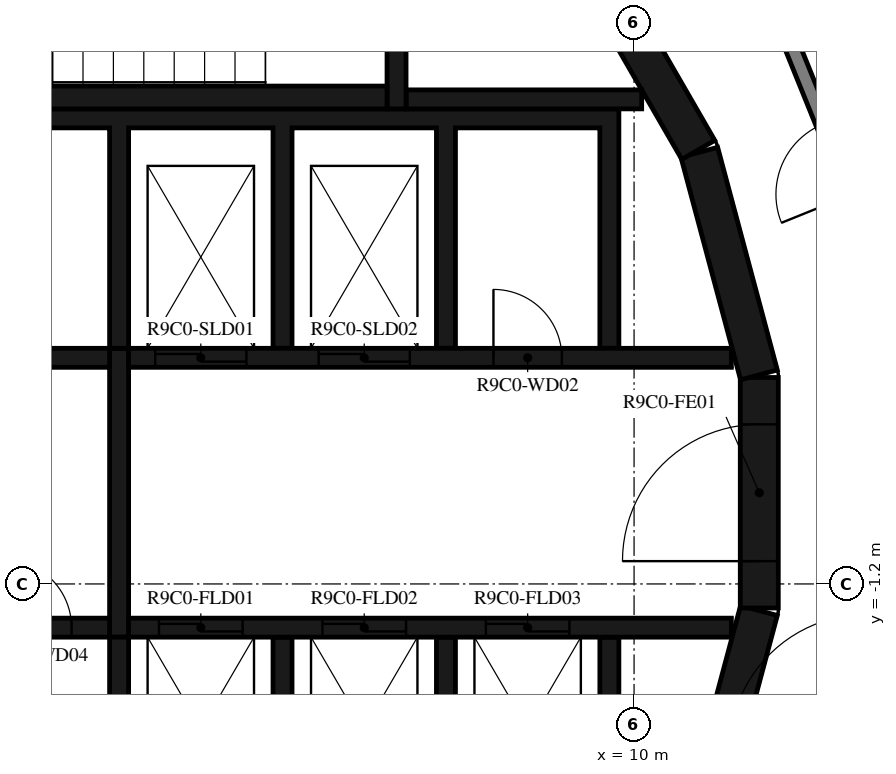
"""IFC4 building model, lengths in metres.
Left out: names, types, materials, properties, quantities, classifications, styles, units other than length and angle.
Written with IfcOpenShell. Run it as: python <this file> out.ifc"""

import sys

from ifc_helpers import new_model, si_unit, direction, frame, frame_2d, origin, place, context, subcontext, project, spatial, polyline, rectangle, outline, extrude, element, fill, save


model = new_model("IFC4")
c1 = context("Model", 3, precision=1e-05, world=origin(), true_north=direction((0.0, 1.0)))
c2 = subcontext(c1, "Body", "Model", "MODEL_VIEW")
j1 = project(units=[si_unit("LENGTHUNIT", "METRE"), si_unit("PLANEANGLEUNIT", "RADIAN")], contexts=[c1])
p1 = place(None, origin())
s1 = spatial("IfcSite", under=j1, at=p1, CompositionType="ELEMENT")
p2 = place(p1, origin())
s2 = spatial("IfcBuilding", under=s1, at=p2, CompositionType="ELEMENT")
p3 = place(p2, frame((0.0, 0.0, 354.0)))
s3 = spatial("IfcBuildingStorey", under=s2, at=p3, CompositionType="ELEMENT", Elevation=354.0)
p4 = place(p3, frame((10.858, -4.479, 0.0), z_axis=(0.0, 0.0, 1.0), x_axis=(0.258734743916, 0.965948410781, 0.0)))
e1 = element("IfcWall", 1, at=p4, inside=s3, PredefinedType="SHEAR", context=c2, shape_type="SweptSolid", body=[
    extrude(rectangle(XDim=3.033, YDim=0.5, at=frame_2d((1.516, 0.0))), origin(), (0.0, 0.0, 1.0), 3.12),
])
p5 = place(p3, frame((11.647, -1.516, 0.0), z_axis=(0.0, 0.0, 1.0), x_axis=(0.0, 1.0, 0.0)))
e2 = element("IfcWall", 2, at=p5, inside=s3, PredefinedType="SHEAR", context=c2, shape_type="SweptSolid", body=[
    extrude(rectangle(XDim=3.033, YDim=0.5, at=frame_2d((1.516, 0.0))), origin(), (0.0, 0.0, 1.0), 3.12),
])
p6 = place(p5, frame((0.616, 0.0, 0.0)))
e3 = element("IfcOpeningElement", 3, at=p6, cuts=e2, PredefinedType="OPENING", context=c2, shape_type="SweptSolid", body=[
    extrude(rectangle(XDim=1.8, YDim=2.1, at=frame_2d((0.9, 1.05))), frame((0.0, 0.26, 0.0), z_axis=(0.0, -1.0, 0.0), x_axis=(1.0, 0.0, 0.0)), (0.0, 0.0, 1.0), 0.52),
])
for number, where, z_axis, x_axis in (
    (4, (11.643, 1.55, 0.0), (0.0, 0.0, 1.0), (-0.259, 0.966, 0.0)),
    (5, (10.845, 4.51, 0.0), (0.0, 0.0, 1.0), (-0.5, 0.866, 0.0)),
):
    element("IfcWall", number, at=place(p3, frame(where, z_axis=z_axis, x_axis=x_axis)), inside=s3, PredefinedType="SHEAR", context=c2, shape_type="SweptSolid", body=[
        extrude(rectangle(XDim=3.033, YDim=0.5, at=frame_2d((1.516, 0.0))), origin(), (0.0, 0.0, 1.0), 3.12),
    ])
p7 = place(p3, frame((0.0, 5.2, 0.0), z_axis=(0.0, 0.0, 1.0), x_axis=(1.0, 0.0, 0.0)))
e6 = element("IfcWall", 6, at=p7, inside=s3, PredefinedType="SHEAR", context=c2, shape_type="SweptSolid", body=[
    extrude(rectangle(XDim=6.75, YDim=0.3, at=frame_2d((3.375, 0.0))), origin(), (0.0, 0.0, 1.0), 3.12),
])
p8 = place(p3, frame((6.875, 5.05, 0.0), z_axis=(0.0, 0.0, 1.0), x_axis=(0.0, 1.0, 0.0)))
e7 = element("IfcWall", 7, at=p8, inside=s3, PredefinedType="SHEAR", context=c2, shape_type="SweptSolid", body=[
    extrude(rectangle(XDim=3.92, YDim=0.25, at=frame_2d((1.96, 0.0))), origin(), (0.0, 0.0, 1.0), 3.12),
])
p9 = place(p8, frame((1.11, 0.0, 0.0)))
e8 = element("IfcOpeningElement", 8, at=p9, cuts=e7, PredefinedType="OPENING", context=c2, shape_type="SweptSolid", body=[
    extrude(rectangle(XDim=1.2, YDim=2.1, at=frame_2d((0.6, 1.05))), frame((0.0, 0.135, 0.0), z_axis=(0.0, -1.0, 0.0), x_axis=(1.0, 0.0, 0.0)), (0.0, 0.0, 1.0), 0.27),
])
p10 = place(p3, frame((7.0, 5.175, 0.0), z_axis=(0.0, 0.0, 1.0), x_axis=(1.0, 0.0, 0.0)))
e9 = element("IfcWall", 9, at=p10, inside=s3, PredefinedType="SHEAR", context=c2, shape_type="SweptSolid", body=[
    extrude(rectangle(XDim=3.1, YDim=0.25, at=frame_2d((1.55, 0.0))), origin(), (0.0, 0.0, 1.0), 3.12),
])
p11 = place(p3, origin())
e10 = element("IfcWall", 10, at=p11, inside=s3, PredefinedType="SHEAR", context=c2, shape_type="SweptSolid", body=[
    extrude(outline(polyline([(-9.8, 1.9), (-9.55, 1.9), (-9.55, 4.8), (3.1, 4.8), (3.1, 1.9), (3.35, 1.9), (3.35, 4.8), (5.25, 4.8), (5.25, 1.9), (5.5, 1.9), (5.5, 4.8), (7.4, 4.8), (7.4, 1.9), (7.65, 1.9), (7.65, 4.8), (9.55, 4.8), (9.55, 1.9), (9.8, 1.9), (9.8, 4.8), (9.8, 5.05), (-9.8, 5.05), (-9.8, 4.8), (-9.8, 1.9)])), origin(), (0.0, 0.0, 1.0), 3.12),
])
p12 = place(p3, origin())
e11 = element("IfcWall", 11, at=p12, inside=s3, PredefinedType="SHEAR", context=c2, shape_type="SweptSolid", body=[
    extrude(outline(polyline([(9.8, -5.05), (9.8, -4.8), (9.8, -1.9), (9.55, -1.9), (9.55, -4.8), (7.65, -4.8), (7.65, -1.9), (7.4, -1.9), (7.4, -4.8), (5.5, -4.8), (5.5, -1.9), (5.25, -1.9), (5.25, -4.8), (3.35, -4.8), (3.35, -1.9), (3.1, -1.9), (3.1, -4.8), (1.2, -4.8), (1.2, -1.9), (0.95, -1.9), (0.95, -4.8), (-0.95, -4.8), (-0.95, -1.9), (-1.2, -1.9), (-1.2, -4.8), (-3.1, -4.8), (-3.1, -1.9), (-3.35, -1.9), (-3.35, -4.8), (-5.25, -4.8), (-5.25, -1.9), (-5.5, -1.9), (-5.5, -4.8), (-9.55, -4.8), (-9.55, -1.9), (-9.8, -1.9), (-9.8, -4.8), (-9.8, -5.05), (9.8, -5.05)])), origin(), (0.0, 0.0, 1.0), 3.12),
])
p13 = place(p3, frame((-11.28, 1.775, 0.0), z_axis=(0.0, 0.0, 1.0), x_axis=(1.0, 0.0, 0.0)))
e12 = element("IfcWall", 12, at=p13, inside=s3, PredefinedType="SHEAR", context=c2, shape_type="SweptSolid", body=[
    extrude(rectangle(XDim=14.38, YDim=0.25, at=frame_2d((7.19, 0.0))), origin(), (0.0, 0.0, 1.0), 3.12),
])
p14 = place(p13, frame((7.605, 0.0, 0.0)))
e13 = element("IfcOpeningElement", 13, at=p14, cuts=e12, PredefinedType="OPENING", context=c2, shape_type="SweptSolid", body=[
    extrude(rectangle(XDim=0.9, YDim=2.1, at=frame_2d((0.45, 1.05))), frame((0.0, 0.135, 0.0), z_axis=(0.0, -1.0, 0.0), x_axis=(1.0, 0.0, 0.0)), (0.0, 0.0, 1.0), 0.27),
])
p15 = place(p3, frame((3.35, 1.775, 0.0), z_axis=(0.0, 0.0, 1.0), x_axis=(1.0, 0.0, 0.0)))
e14 = element("IfcWall", 14, at=p15, inside=s3, PredefinedType="SHEAR", context=c2, shape_type="SweptSolid", body=[
    extrude(rectangle(XDim=7.93, YDim=0.25, at=frame_2d((3.965, 0.0))), origin(), (0.0, 0.0, 1.0), 3.12),
])
p16 = place(p15, frame((0.35, 0.0, 0.0)))
e15 = element("IfcOpeningElement", 15, at=p16, cuts=e14, PredefinedType="OPENING", context=c2, shape_type="SweptSolid", body=[
    extrude(rectangle(XDim=1.2, YDim=2.4, at=frame_2d((0.6, 1.2))), frame((0.0, 0.135, 0.0), z_axis=(0.0, -1.0, 0.0), x_axis=(1.0, 0.0, 0.0)), (0.0, 0.0, 1.0), 0.27),
])
p17 = place(p15, frame((2.5, 0.0, 0.0)))
e16 = element("IfcOpeningElement", 16, at=p17, cuts=e14, PredefinedType="OPENING", context=c2, shape_type="SweptSolid", body=[
    extrude(rectangle(XDim=1.2, YDim=2.4, at=frame_2d((0.6, 1.2))), frame((0.0, 0.135, 0.0), z_axis=(0.0, -1.0, 0.0), x_axis=(1.0, 0.0, 0.0)), (0.0, 0.0, 1.0), 0.27),
])
p18 = place(p15, frame((4.8, 0.0, 0.0)))
e17 = element("IfcOpeningElement", 17, at=p18, cuts=e14, PredefinedType="OPENING", context=c2, shape_type="SweptSolid", body=[
    extrude(rectangle(XDim=0.9, YDim=2.1, at=frame_2d((0.45, 1.05))), frame((0.0, 0.135, 0.0), z_axis=(0.0, -1.0, 0.0), x_axis=(1.0, 0.0, 0.0)), (0.0, 0.0, 1.0), 0.27),
])
p19 = place(p3, frame((-11.28, -1.775, 0.0), z_axis=(0.0, 0.0, 1.0), x_axis=(1.0, 0.0, 0.0)))
e18 = element("IfcWall", 18, at=p19, inside=s3, PredefinedType="SHEAR", context=c2, shape_type="SweptSolid", body=[
    extrude(rectangle(XDim=14.38, YDim=0.25, at=frame_2d((7.19, 0.0))), origin(), (0.0, 0.0, 1.0), 3.12),
])
p20 = place(p19, frame((6.43, 0.0, 0.0)))
e19 = element("IfcOpeningElement", 19, at=p20, cuts=e18, PredefinedType="OPENING", context=c2, shape_type="SweptSolid", body=[
    extrude(rectangle(XDim=1.1, YDim=2.1, at=frame_2d((0.55, 1.05))), frame((0.0, 0.135, 0.0), z_axis=(0.0, -1.0, 0.0), x_axis=(1.0, 0.0, 0.0)), (0.0, 0.0, 1.0), 0.27),
])
p21 = place(p19, frame((8.58, 0.0, 0.0)))
e20 = element("IfcOpeningElement", 20, at=p21, cuts=e18, PredefinedType="OPENING", context=c2, shape_type="SweptSolid", body=[
    extrude(rectangle(XDim=1.1, YDim=2.1, at=frame_2d((0.55, 1.05))), frame((0.0, 0.135, 0.0), z_axis=(0.0, -1.0, 0.0), x_axis=(1.0, 0.0, 0.0)), (0.0, 0.0, 1.0), 0.27),
])
p22 = place(p19, frame((10.73, 0.0, 0.0)))
e21 = element("IfcOpeningElement", 21, at=p22, cuts=e18, PredefinedType="OPENING", context=c2, shape_type="SweptSolid", body=[
    extrude(rectangle(XDim=1.1, YDim=2.1, at=frame_2d((0.55, 1.05))), frame((0.0, 0.135, 0.0), z_axis=(0.0, -1.0, 0.0), x_axis=(1.0, 0.0, 0.0)), (0.0, 0.0, 1.0), 0.27),
])
p23 = place(p19, frame((3.305, 0.0, 0.0)))
e22 = element("IfcOpeningElement", 22, at=p23, cuts=e18, PredefinedType="OPENING", context=c2, shape_type="SweptSolid", body=[
    extrude(rectangle(XDim=0.9, YDim=2.1, at=frame_2d((0.45, 1.05))), frame((0.0, 0.135, 0.0), z_axis=(0.0, -1.0, 0.0), x_axis=(1.0, 0.0, 0.0)), (0.0, 0.0, 1.0), 0.27),
])
p24 = place(p19, frame((12.98, 0.0, 0.0)))
e23 = element("IfcOpeningElement", 23, at=p24, cuts=e18, PredefinedType="OPENING", context=c2, shape_type="SweptSolid", body=[
    extrude(rectangle(XDim=0.9, YDim=2.1, at=frame_2d((0.45, 1.05))), frame((0.0, 0.135, 0.0), z_axis=(0.0, -1.0, 0.0), x_axis=(1.0, 0.0, 0.0)), (0.0, 0.0, 1.0), 0.27),
])
p25 = place(p3, frame((3.35, -1.775, 0.0), z_axis=(0.0, 0.0, 1.0), x_axis=(1.0, 0.0, 0.0)))
e24 = element("IfcWall", 24, at=p25, inside=s3, PredefinedType="SHEAR", context=c2, shape_type="SweptSolid", body=[
    extrude(rectangle(XDim=7.93, YDim=0.25, at=frame_2d((3.965, 0.0))), origin(), (0.0, 0.0, 1.0), 3.12),
])
p26 = place(p25, frame((0.4, 0.0, 0.0)))
e25 = element("IfcOpeningElement", 25, at=p26, cuts=e24, PredefinedType="OPENING", context=c2, shape_type="SweptSolid", body=[
    extrude(rectangle(XDim=1.1, YDim=2.4, at=frame_2d((0.55, 1.2))), frame((0.0, 0.135, 0.0), z_axis=(0.0, -1.0, 0.0), x_axis=(1.0, 0.0, 0.0)), (0.0, 0.0, 1.0), 0.27),
])
p27 = place(p25, frame((2.55, 0.0, 0.0)))
e26 = element("IfcOpeningElement", 26, at=p27, cuts=e24, PredefinedType="OPENING", context=c2, shape_type="SweptSolid", body=[
    extrude(rectangle(XDim=1.1, YDim=2.4, at=frame_2d((0.55, 1.2))), frame((0.0, 0.135, 0.0), z_axis=(0.0, -1.0, 0.0), x_axis=(1.0, 0.0, 0.0)), (0.0, 0.0, 1.0), 0.27),
])
p28 = place(p25, frame((4.7, 0.0, 0.0)))
e27 = element("IfcOpeningElement", 27, at=p28, cuts=e24, PredefinedType="OPENING", context=c2, shape_type="SweptSolid", body=[
    extrude(rectangle(XDim=1.1, YDim=2.4, at=frame_2d((0.55, 1.2))), frame((0.0, 0.135, 0.0), z_axis=(0.0, -1.0, 0.0), x_axis=(1.0, 0.0, 0.0)), (0.0, 0.0, 1.0), 0.27),
])
p29 = place(p3, frame((3.225, -1.9, 0.0), z_axis=(0.0, 0.0, 1.0), x_axis=(0.0, 1.0, 0.0)))
e28 = element("IfcWall", 28, at=p29, inside=s3, PredefinedType="SHEAR", context=c2, shape_type="SweptSolid", body=[
    extrude(rectangle(XDim=3.8, YDim=0.25, at=frame_2d((1.9, 0.0))), origin(), (0.0, 0.0, 1.0), 3.12),
])
p30 = place(p3, frame((13.769, 1.691, 0.0), z_axis=(0.0, 0.0, 1.0), x_axis=(-0.374618189599, 0.92717916932, 0.0)))
e29 = element("IfcWall", 29, at=p30, inside=s3, PredefinedType="STANDARD", context=c2, shape_type="SweptSolid", body=[
    extrude(rectangle(XDim=7.181, YDim=0.2, at=frame_2d((3.591, 0.0))), origin(), (0.0, 0.0, 1.0), 3.12),
])
p31 = place(p30, frame((2.41, 0.0, 0.0)))
e30 = element("IfcOpeningElement", 30, at=p31, cuts=e29, PredefinedType="OPENING", context=c2, shape_type="SweptSolid", body=[
    extrude(rectangle(XDim=1.0, YDim=2.1, at=frame_2d((0.5, 1.05))), frame((0.0, 0.11, 0.0), z_axis=(0.0, -1.0, 0.0), x_axis=(1.0, 0.0, 0.0)), (0.0, 0.0, 1.0), 0.22),
])
p32 = place(p6, origin())
e31 = element("IfcDoor", 31, at=p32, inside=s3, OperationType="DOUBLE_DOOR_SINGLE_SWING", PredefinedType="DOOR", context=c2, shape_type="SweptSolid", body=[
    extrude(rectangle(XDim=1.8, YDim=2.1, at=frame_2d((0.9, 1.05))), frame((0.0, 0.025, 0.0), z_axis=(0.0, -1.0, 0.0), x_axis=(1.0, 0.0, 0.0)), (0.0, 0.0, 1.0), 0.05),
])
fill(e3, e31)
p33 = place(p16, origin())
e32 = element("IfcDoor", 32, at=p33, inside=s3, OperationType="DOUBLE_DOOR_SLIDING", PredefinedType="DOOR", context=c2, shape_type="SweptSolid", body=[
    extrude(rectangle(XDim=1.2, YDim=2.4, at=frame_2d((0.6, 1.2))), frame((0.0, 0.025, 0.0), z_axis=(0.0, -1.0, 0.0), x_axis=(1.0, 0.0, 0.0)), (0.0, 0.0, 1.0), 0.05),
])
fill(e15, e32)
p34 = place(p17, origin())
e33 = element("IfcDoor", 33, at=p34, inside=s3, OperationType="DOUBLE_DOOR_SLIDING", PredefinedType="DOOR", context=c2, shape_type="SweptSolid", body=[
    extrude(rectangle(XDim=1.2, YDim=2.4, at=frame_2d((0.6, 1.2))), frame((0.0, 0.025, 0.0), z_axis=(0.0, -1.0, 0.0), x_axis=(1.0, 0.0, 0.0)), (0.0, 0.0, 1.0), 0.05),
])
fill(e16, e33)
p35 = place(p26, origin())
e34 = element("IfcDoor", 34, at=p35, inside=s3, OperationType="DOUBLE_DOOR_SLIDING", PredefinedType="DOOR", context=c2, shape_type="SweptSolid", body=[
    extrude(rectangle(XDim=1.1, YDim=2.4, at=frame_2d((0.55, 1.2))), frame((0.0, 0.025, 0.0), z_axis=(0.0, -1.0, 0.0), x_axis=(1.0, 0.0, 0.0)), (0.0, 0.0, 1.0), 0.05),
])
fill(e25, e34)
p36 = place(p27, origin())
e35 = element("IfcDoor", 35, at=p36, inside=s3, OperationType="DOUBLE_DOOR_SLIDING", PredefinedType="DOOR", context=c2, shape_type="SweptSolid", body=[
    extrude(rectangle(XDim=1.1, YDim=2.4, at=frame_2d((0.55, 1.2))), frame((0.0, 0.025, 0.0), z_axis=(0.0, -1.0, 0.0), x_axis=(1.0, 0.0, 0.0)), (0.0, 0.0, 1.0), 0.05),
])
fill(e26, e35)
p37 = place(p28, origin())
e36 = element("IfcDoor", 36, at=p37, inside=s3, OperationType="DOUBLE_DOOR_SLIDING", PredefinedType="DOOR", context=c2, shape_type="SweptSolid", body=[
    extrude(rectangle(XDim=1.1, YDim=2.4, at=frame_2d((0.55, 1.2))), frame((0.0, 0.025, 0.0), z_axis=(0.0, -1.0, 0.0), x_axis=(1.0, 0.0, 0.0)), (0.0, 0.0, 1.0), 0.05),
])
fill(e27, e36)
p38 = place(p18, origin())
e37 = element("IfcDoor", 37, at=p38, inside=s3, OperationType="SINGLE_SWING_RIGHT", PredefinedType="DOOR", context=c2, shape_type="SweptSolid", body=[
    extrude(rectangle(XDim=0.9, YDim=2.1, at=frame_2d((0.45, 1.05))), frame((0.0, 0.025, 0.0), z_axis=(0.0, -1.0, 0.0), x_axis=(1.0, 0.0, 0.0)), (0.0, 0.0, 1.0), 0.05),
])
fill(e17, e37)
p39 = place(p24, origin())
e38 = element("IfcDoor", 38, at=p39, inside=s3, OperationType="SINGLE_SWING_RIGHT", PredefinedType="DOOR", context=c2, shape_type="SweptSolid", body=[
    extrude(rectangle(XDim=0.9, YDim=2.1, at=frame_2d((0.45, 1.05))), frame((0.0, 0.025, 0.0), z_axis=(0.0, -1.0, 0.0), x_axis=(1.0, 0.0, 0.0)), (0.0, 0.0, 1.0), 0.05),
])
fill(e23, e38)
save(model, sys.argv[1])
